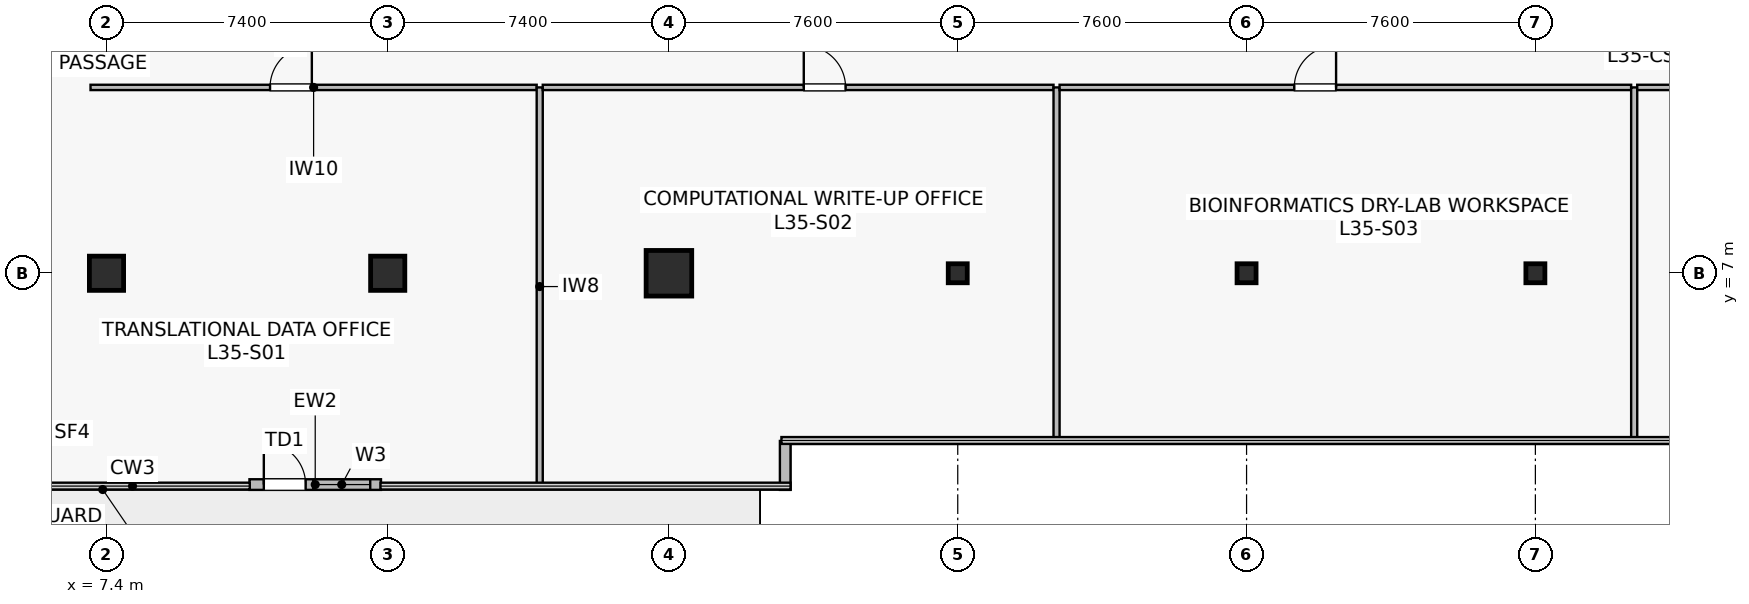
"""IFC4 building model, lengths in metres.
Left out: names, types, materials, properties, quantities, classifications, styles, units other than length and angle.
Written with IfcOpenShell. Run it as: python <this file> out.ifc"""

import sys

from ifc_helpers import new_model, si_unit, direction, frame, frame_2d, origin, origin_2d, place, context, subcontext, project, spatial, rectangle, hollow_rectangle, extrude, source, transform, mapped, element, fill, save


model = new_model("IFC4")
c1 = context("Model", 3, precision=1e-05, world=origin(), true_north=direction((0.0, 1.0)))
c2 = subcontext(c1, "Body", "Model", "MODEL_VIEW")
j1 = project(units=[si_unit("LENGTHUNIT", "METRE"), si_unit("PLANEANGLEUNIT", "RADIAN")], contexts=[c1])
p1 = place(None, origin())
s1 = spatial("IfcSite", under=j1, at=p1, CompositionType="ELEMENT")
p2 = place(p1, origin())
s2 = spatial("IfcBuilding", under=s1, at=p2, CompositionType="ELEMENT")
p3 = place(p2, frame((0.0, 0.0, 146.1)))
s3 = spatial("IfcBuildingStorey", under=s2, at=p3, CompositionType="ELEMENT", Elevation=146.1)
m1 = source(origin(), c2, "Body", "SweptSolid", [
    extrude(rectangle(XDim=0.9, YDim=0.9, at=origin_2d()), origin(), (0.0, 0.0, 1.0), 4.1),
])
p4 = place(p3, frame((14.8, 7.0, 0.0), z_axis=(0.0, 0.0, 1.0), x_axis=(1.0, 0.0, 0.0)))
e1 = element("IfcColumn", 1, at=p4, inside=s3, PredefinedType="COLUMN", context=c2, shape_type="MappedRepresentation", body=[
    mapped(m1, transform((0.0, 0.0, 0.0), scale=1.0)),
])
m2 = source(origin(), c2, "Body", "SweptSolid", [
    extrude(rectangle(XDim=1.2, YDim=1.2, at=origin_2d()), origin(), (0.0, 0.0, 1.0), 4.1),
])
p5 = place(p3, frame((22.2, 7.0, 0.0), z_axis=(0.0, 0.0, 1.0), x_axis=(1.0, 0.0, 0.0)))
e2 = element("IfcColumn", 2, at=p5, inside=s3, PredefinedType="COLUMN", context=c2, shape_type="MappedRepresentation", body=[
    mapped(m2, transform((0.0, 0.0, 0.0), scale=1.0)),
])
p6 = place(p3, frame((7.4, 7.0, 0.0), z_axis=(0.0, 0.0, 1.0), x_axis=(1.0, 0.0, 0.0)))
e3 = element("IfcColumn", 3, at=p6, inside=s3, PredefinedType="COLUMN", context=c2, shape_type="MappedRepresentation", body=[
    mapped(m1, transform((0.0, 0.0, 0.0), scale=1.0)),
])
m3 = source(origin(), c2, "Body", "SweptSolid", [
    extrude(hollow_rectangle(XDim=0.5, YDim=0.5, WallThickness=0.022, at=origin_2d()), origin(), (0.0, 0.0, 1.0), 4.1),
])
for number, where, z_axis, x_axis in (
    (4, (29.8, 7.0, 0.0), (0.0, 0.0, 1.0), (1.0, 0.0, 0.0)),
    (5, (37.4, 7.0, 0.0), (0.0, 0.0, 1.0), (1.0, 0.0, 0.0)),
    (6, (45.0, 7.0, 0.0), (0.0, 0.0, 1.0), (1.0, 0.0, 0.0)),
):
    element("IfcColumn", number, at=place(p3, frame(where, z_axis=z_axis, x_axis=x_axis)), inside=s3, PredefinedType="COLUMN", context=c2, shape_type="MappedRepresentation", body=[
        mapped(m3, transform((0.0, 0.0, 0.0), scale=1.0)),
    ])
p7 = place(p3, frame((11.162, 1.44, 0.0), z_axis=(0.0, 0.0, 1.0), x_axis=(1.0, 0.0, 0.0)))
e7 = element("IfcWall", 7, at=p7, inside=s3, PredefinedType="STANDARD", context=c2, shape_type="SweptSolid", body=[
    extrude(rectangle(XDim=3.461, YDim=0.28, at=frame_2d((1.73, 0.0))), origin(), (0.0, 0.0, 1.0), 3.79),
])
p8 = place(p7, frame((0.378, 0.0, 0.0)))
e8 = element("IfcOpeningElement", 8, at=p8, cuts=e7, PredefinedType="OPENING", context=c2, shape_type="SweptSolid", body=[
    extrude(rectangle(XDim=1.1, YDim=2.2, at=frame_2d((0.55, 1.1))), frame((0.0, 0.15, 0.0), z_axis=(0.0, -1.0, 0.0), x_axis=(1.0, 0.0, 0.0)), (0.0, 0.0, 1.0), 0.3),
])
p9 = place(p7, frame((1.678, 0.0, 0.9)))
e9 = element("IfcOpeningElement", 9, at=p9, cuts=e7, PredefinedType="OPENING", context=c2, shape_type="SweptSolid", body=[
    extrude(rectangle(XDim=1.5, YDim=2.2, at=frame_2d((0.75, 1.1))), frame((0.0, 0.15, 0.0), z_axis=(0.0, -1.0, 0.0), x_axis=(1.0, 0.0, 0.0)), (0.0, 0.0, 1.0), 0.3),
])
p10 = place(p3, frame((25.26, 1.3, 0.0), z_axis=(0.0, 0.0, 1.0), x_axis=(0.0, 1.0, 0.0)))
e10 = element("IfcWall", 10, at=p10, inside=s3, PredefinedType="STANDARD", context=c2, shape_type="SweptSolid", body=[
    extrude(rectangle(XDim=1.288, YDim=0.28, at=frame_2d((0.644, 0.0))), origin(), (0.0, 0.0, 1.0), 3.79),
])
p11 = place(p3, frame((6.98, 11.89, 0.0), z_axis=(0.0, 0.0, 1.0), x_axis=(1.0, 0.0, 0.0)))
e11 = element("IfcWall", 11, at=p11, inside=s3, PredefinedType="PARTITIONING", context=c2, shape_type="SweptSolid", body=[
    extrude(rectangle(XDim=11.74, YDim=0.14, at=frame_2d((5.87, 0.0))), origin(), (0.0, 0.0, 1.0), 3.125),
])
p12 = place(p11, frame((4.724, 0.0, 0.0)))
e12 = element("IfcOpeningElement", 12, at=p12, cuts=e11, PredefinedType="OPENING", context=c2, shape_type="SweptSolid", body=[
    extrude(rectangle(XDim=1.1, YDim=2.18, at=frame_2d((0.55, 1.09))), frame((0.0, 0.08, 0.0), z_axis=(0.0, -1.0, 0.0), x_axis=(1.0, 0.0, 0.0)), (0.0, 0.0, 1.0), 0.16),
])
p13 = place(p3, frame((18.8, 1.41, 0.0), z_axis=(0.0, 0.0, 1.0), x_axis=(0.0, 1.0, 0.0)))
e13 = element("IfcWall", 13, at=p13, inside=s3, PredefinedType="PARTITIONING", context=c2, shape_type="SweptSolid", body=[
    extrude(rectangle(XDim=10.48, YDim=0.16, at=frame_2d((5.24, 0.0))), origin(), (0.0, 0.0, 1.0), 3.075),
])
p14 = place(p3, frame((18.88, 11.89, 0.0), z_axis=(0.0, 0.0, 1.0), x_axis=(1.0, 0.0, 0.0)))
e14 = element("IfcWall", 14, at=p14, inside=s3, PredefinedType="PARTITIONING", context=c2, shape_type="SweptSolid", body=[
    extrude(rectangle(XDim=13.44, YDim=0.14, at=frame_2d((6.72, 0.0))), origin(), (0.0, 0.0, 1.0), 3.125),
])
p15 = place(p14, frame((6.868, 0.0, 0.0)))
e15 = element("IfcOpeningElement", 15, at=p15, cuts=e14, PredefinedType="OPENING", context=c2, shape_type="SweptSolid", body=[
    extrude(rectangle(XDim=1.1, YDim=2.18, at=frame_2d((0.55, 1.09))), frame((0.0, 0.08, 0.0), z_axis=(0.0, -1.0, 0.0), x_axis=(1.0, 0.0, 0.0)), (0.0, 0.0, 1.0), 0.16),
])
p16 = place(p3, frame((32.4, 2.61, 0.0), z_axis=(0.0, 0.0, 1.0), x_axis=(0.0, 1.0, 0.0)))
e16 = element("IfcWall", 16, at=p16, inside=s3, PredefinedType="PARTITIONING", context=c2, shape_type="SweptSolid", body=[
    extrude(rectangle(XDim=9.28, YDim=0.16, at=frame_2d((4.64, 0.0))), origin(), (0.0, 0.0, 1.0), 3.075),
])
p17 = place(p3, frame((32.48, 11.89, 0.0), z_axis=(0.0, 0.0, 1.0), x_axis=(1.0, 0.0, 0.0)))
e17 = element("IfcWall", 17, at=p17, inside=s3, PredefinedType="PARTITIONING", context=c2, shape_type="SweptSolid", body=[
    extrude(rectangle(XDim=15.04, YDim=0.14, at=frame_2d((7.52, 0.0))), origin(), (0.0, 0.0, 1.0), 3.125),
])
p18 = place(p17, frame((6.176, 0.0, 0.0)))
e18 = element("IfcOpeningElement", 18, at=p18, cuts=e17, PredefinedType="OPENING", context=c2, shape_type="SweptSolid", body=[
    extrude(rectangle(XDim=1.1, YDim=2.18, at=frame_2d((0.55, 1.09))), frame((0.0, 0.08, 0.0), z_axis=(0.0, -1.0, 0.0), x_axis=(1.0, 0.0, 0.0)), (0.0, 0.0, 1.0), 0.16),
])
p19 = place(p3, frame((47.6, 2.61, 0.0), z_axis=(0.0, 0.0, 1.0), x_axis=(0.0, 1.0, 0.0)))
e19 = element("IfcWall", 19, at=p19, inside=s3, PredefinedType="PARTITIONING", context=c2, shape_type="SweptSolid", body=[
    extrude(rectangle(XDim=9.28, YDim=0.16, at=frame_2d((4.64, 0.0))), origin(), (0.0, 0.0, 1.0), 3.075),
])
p20 = place(p3, frame((47.68, 11.89, 0.0), z_axis=(0.0, 0.0, 1.0), x_axis=(1.0, 0.0, 0.0)))
e20 = element("IfcWall", 20, at=p20, inside=s3, PredefinedType="PARTITIONING", context=c2, shape_type="SweptSolid", body=[
    extrude(rectangle(XDim=12.44, YDim=0.14, at=frame_2d((6.22, 0.0))), origin(), (0.0, 0.0, 1.0), 3.125),
])
p21 = place(p20, frame((6.308, 0.0, 0.0)))
e21 = element("IfcOpeningElement", 21, at=p21, cuts=e20, PredefinedType="OPENING", context=c2, shape_type="SweptSolid", body=[
    extrude(rectangle(XDim=1.1, YDim=2.18, at=frame_2d((0.55, 1.09))), frame((0.0, 0.08, 0.0), z_axis=(0.0, -1.0, 0.0), x_axis=(1.0, 0.0, 0.0)), (0.0, 0.0, 1.0), 0.16),
])
m4 = source(origin(), c2, "Body", "SweptSolid", [
    extrude(rectangle(XDim=1.1, YDim=2.2, at=frame_2d((0.55, 1.1))), frame((0.0, 0.025, 0.0), z_axis=(0.0, -1.0, 0.0), x_axis=(1.0, 0.0, 0.0)), (0.0, 0.0, 1.0), 0.05),
])
p22 = place(p8, origin())
e22 = element("IfcDoor", 22, at=p22, inside=s3, OperationType="SINGLE_SWING_LEFT", PredefinedType="DOOR", context=c2, shape_type="MappedRepresentation", body=[
    mapped(m4, transform((0.0, 0.0, 0.0), scale=1.0)),
])
fill(e8, e22)
m5 = source(origin(), c2, "Body", "SweptSolid", [
    extrude(rectangle(XDim=1.5, YDim=2.2, at=frame_2d((0.75, 1.1))), frame((0.0, 0.03, 0.0), z_axis=(0.0, -1.0, 0.0), x_axis=(1.0, 0.0, 0.0)), (0.0, 0.0, 1.0), 0.06),
])
p23 = place(p9, origin())
e23 = element("IfcWindow", 23, at=p23, inside=s3, PartitioningType="SINGLE_PANEL", PredefinedType="WINDOW", context=c2, shape_type="MappedRepresentation", body=[
    mapped(m5, transform((0.0, 0.0, 0.0), scale=1.0)),
])
fill(e9, e23)
m6 = source(origin(), c2, "Body", "SweptSolid", [
    extrude(rectangle(XDim=1.1, YDim=2.18, at=frame_2d((0.55, 1.09))), frame((0.0, 0.025, 0.0), z_axis=(0.0, -1.0, 0.0), x_axis=(1.0, 0.0, 0.0)), (0.0, 0.0, 1.0), 0.05),
])
p24 = place(p12, origin())
e24 = element("IfcDoor", 24, at=p24, inside=s3, OperationType="SINGLE_SWING_RIGHT", PredefinedType="DOOR", context=c2, shape_type="MappedRepresentation", body=[
    mapped(m6, transform((0.0, 0.0, 0.0), scale=1.0)),
])
fill(e12, e24)
p25 = place(p15, origin())
e25 = element("IfcDoor", 25, at=p25, inside=s3, OperationType="SINGLE_SWING_LEFT", PredefinedType="DOOR", context=c2, shape_type="MappedRepresentation", body=[
    mapped(m6, transform((0.0, 0.0, 0.0), scale=1.0)),
])
fill(e15, e25)
p26 = place(p18, origin())
e26 = element("IfcDoor", 26, at=p26, inside=s3, OperationType="SINGLE_SWING_RIGHT", PredefinedType="DOOR", context=c2, shape_type="MappedRepresentation", body=[
    mapped(m6, transform((0.0, 0.0, 0.0), scale=1.0)),
])
fill(e18, e26)
save(model, sys.argv[1])
